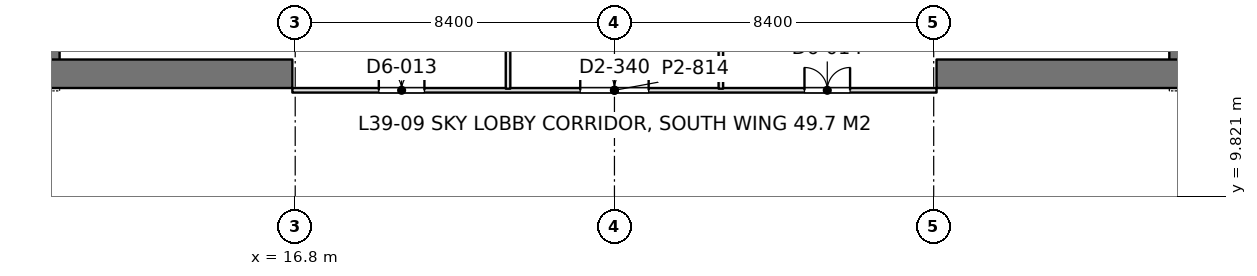
"""IFC4 building model, lengths in metres.
Left out: names, types, materials, properties, quantities, classifications, styles, units other than length and angle.
Written with IfcOpenShell. Run it as: python <this file> out.ifc"""

import sys

from ifc_helpers import new_model, si_unit, direction, frame, frame_2d, origin, place, context, subcontext, project, spatial, rectangle, extrude, element, fill, save


model = new_model("IFC4")
c1 = context("Model", 3, precision=1e-05, world=origin(), true_north=direction((0.0, 1.0)))
c2 = subcontext(c1, "Body", "Model", "MODEL_VIEW")
j1 = project(units=[si_unit("LENGTHUNIT", "METRE"), si_unit("PLANEANGLEUNIT", "RADIAN")], contexts=[c1])
p1 = place(None, origin())
s1 = spatial("IfcSite", under=j1, at=p1, CompositionType="ELEMENT")
p2 = place(p1, origin())
s2 = spatial("IfcBuilding", under=s1, at=p2, CompositionType="ELEMENT")
p3 = place(p2, frame((0.0, 0.0, 173.4)))
s3 = spatial("IfcBuildingStorey", under=s2, at=p3, CompositionType="ELEMENT", Elevation=173.4)
p4 = place(p3, frame((-1.125, 13.05, 0.0), z_axis=(0.0, 0.0, 1.0), x_axis=(1.0, 0.0, 0.0)))
e1 = element("IfcWall", 1, at=p4, inside=s3, PredefinedType="SHEAR", context=c2, shape_type="SweptSolid", body=[
    extrude(rectangle(XDim=17.85, YDim=0.75, at=frame_2d((8.925, 0.0))), origin(), (0.0, 0.0, 1.0), 4.2),
])
p5 = place(p4, frame((8.875, 0.0, 0.0)))
e2 = element("IfcOpeningElement", 2, at=p5, cuts=e1, PredefinedType="OPENING", context=c2, shape_type="SweptSolid", body=[
    extrude(rectangle(XDim=1.8, YDim=2.4, at=frame_2d((0.9, 1.2))), frame((0.0, 0.385, 0.0), z_axis=(0.0, -1.0, 0.0), x_axis=(1.0, 0.0, 0.0)), (0.0, 0.0, 1.0), 0.77),
])
p6 = place(p3, frame((10.4, 13.05, 0.0), z_axis=(0.0, 0.0, 1.0), x_axis=(0.0, 1.0, 0.0)))
e3 = element("IfcWall", 3, at=p6, inside=s3, PredefinedType="SHEAR", context=c2, shape_type="SweptSolid", body=[
    extrude(rectangle(XDim=24.3, YDim=0.4, at=frame_2d((12.15, 0.0))), origin(), (0.0, 0.0, 1.0), 4.2),
])
p7 = place(p6, frame((15.75, 0.0, 0.0)))
e4 = element("IfcOpeningElement", 4, at=p7, cuts=e3, PredefinedType="OPENING", context=c2, shape_type="SweptSolid", body=[
    extrude(rectangle(XDim=1.1, YDim=2.2, at=frame_2d((0.55, 1.1))), frame((0.0, 0.21, 0.0), z_axis=(0.0, -1.0, 0.0), x_axis=(1.0, 0.0, 0.0)), (0.0, 0.0, 1.0), 0.42),
])
p8 = place(p6, frame((18.6, 0.0, 0.0)))
e5 = element("IfcOpeningElement", 5, at=p8, cuts=e3, PredefinedType="OPENING", context=c2, shape_type="SweptSolid", body=[
    extrude(rectangle(XDim=1.1, YDim=2.2, at=frame_2d((0.55, 1.1))), frame((0.0, 0.21, 0.0), z_axis=(0.0, -1.0, 0.0), x_axis=(1.0, 0.0, 0.0)), (0.0, 0.0, 1.0), 0.42),
])
p9 = place(p6, frame((21.45, 0.0, 0.0)))
e6 = element("IfcOpeningElement", 6, at=p9, cuts=e3, PredefinedType="OPENING", context=c2, shape_type="SweptSolid", body=[
    extrude(rectangle(XDim=1.1, YDim=2.2, at=frame_2d((0.55, 1.1))), frame((0.0, 0.21, 0.0), z_axis=(0.0, -1.0, 0.0), x_axis=(1.0, 0.0, 0.0)), (0.0, 0.0, 1.0), 0.42),
])
p10 = place(p6, frame((6.05, 0.0, 0.0)))
e7 = element("IfcOpeningElement", 7, at=p10, cuts=e3, PredefinedType="OPENING", context=c2, shape_type="SweptSolid", body=[
    extrude(rectangle(XDim=1.8, YDim=2.4, at=frame_2d((0.9, 1.2))), frame((0.0, 0.21, 0.0), z_axis=(0.0, -1.0, 0.0), x_axis=(1.0, 0.0, 0.0)), (0.0, 0.0, 1.0), 0.42),
])
p11 = place(p6, frame((11.25, 0.0, 0.0)))
e8 = element("IfcOpeningElement", 8, at=p11, cuts=e3, PredefinedType="OPENING", context=c2, shape_type="SweptSolid", body=[
    extrude(rectangle(XDim=1.8, YDim=2.4, at=frame_2d((0.9, 1.2))), frame((0.0, 0.21, 0.0), z_axis=(0.0, -1.0, 0.0), x_axis=(1.0, 0.0, 0.0)), (0.0, 0.0, 1.0), 0.42),
])
p12 = place(p3, frame((33.675, 13.05, 0.0), z_axis=(0.0, 0.0, 1.0), x_axis=(1.0, 0.0, 0.0)))
e9 = element("IfcWall", 9, at=p12, inside=s3, PredefinedType="SHEAR", context=c2, shape_type="SweptSolid", body=[
    extrude(rectangle(XDim=17.85, YDim=0.75, at=frame_2d((8.925, 0.0))), origin(), (0.0, 0.0, 1.0), 4.2),
])
p13 = place(p12, frame((7.175, 0.0, 0.0)))
e10 = element("IfcOpeningElement", 10, at=p13, cuts=e9, PredefinedType="OPENING", context=c2, shape_type="SweptSolid", body=[
    extrude(rectangle(XDim=1.8, YDim=2.4, at=frame_2d((0.9, 1.2))), frame((0.0, 0.385, 0.0), z_axis=(0.0, -1.0, 0.0), x_axis=(1.0, 0.0, 0.0)), (0.0, 0.0, 1.0), 0.77),
])
p14 = place(p3, frame((40.0, 13.05, 0.0), z_axis=(0.0, 0.0, 1.0), x_axis=(0.0, 1.0, 0.0)))
e11 = element("IfcWall", 11, at=p14, inside=s3, PredefinedType="SHEAR", context=c2, shape_type="SweptSolid", body=[
    extrude(rectangle(XDim=24.3, YDim=0.4, at=frame_2d((12.15, 0.0))), origin(), (0.0, 0.0, 1.0), 4.2),
])
p15 = place(p14, frame((15.75, 0.0, 0.0)))
e12 = element("IfcOpeningElement", 12, at=p15, cuts=e11, PredefinedType="OPENING", context=c2, shape_type="SweptSolid", body=[
    extrude(rectangle(XDim=1.1, YDim=2.2, at=frame_2d((0.55, 1.1))), frame((0.0, 0.21, 0.0), z_axis=(0.0, -1.0, 0.0), x_axis=(1.0, 0.0, 0.0)), (0.0, 0.0, 1.0), 0.42),
])
p16 = place(p14, frame((18.6, 0.0, 0.0)))
e13 = element("IfcOpeningElement", 13, at=p16, cuts=e11, PredefinedType="OPENING", context=c2, shape_type="SweptSolid", body=[
    extrude(rectangle(XDim=1.1, YDim=2.2, at=frame_2d((0.55, 1.1))), frame((0.0, 0.21, 0.0), z_axis=(0.0, -1.0, 0.0), x_axis=(1.0, 0.0, 0.0)), (0.0, 0.0, 1.0), 0.42),
])
p17 = place(p14, frame((21.45, 0.0, 0.0)))
e14 = element("IfcOpeningElement", 14, at=p17, cuts=e11, PredefinedType="OPENING", context=c2, shape_type="SweptSolid", body=[
    extrude(rectangle(XDim=1.1, YDim=2.2, at=frame_2d((0.55, 1.1))), frame((0.0, 0.21, 0.0), z_axis=(0.0, -1.0, 0.0), x_axis=(1.0, 0.0, 0.0)), (0.0, 0.0, 1.0), 0.42),
])
p18 = place(p14, frame((6.05, 0.0, 0.0)))
e15 = element("IfcOpeningElement", 15, at=p18, cuts=e11, PredefinedType="OPENING", context=c2, shape_type="SweptSolid", body=[
    extrude(rectangle(XDim=1.8, YDim=2.4, at=frame_2d((0.9, 1.2))), frame((0.0, 0.21, 0.0), z_axis=(0.0, -1.0, 0.0), x_axis=(1.0, 0.0, 0.0)), (0.0, 0.0, 1.0), 0.42),
])
p19 = place(p14, frame((11.25, 0.0, 0.0)))
e16 = element("IfcOpeningElement", 16, at=p19, cuts=e11, PredefinedType="OPENING", context=c2, shape_type="SweptSolid", body=[
    extrude(rectangle(XDim=1.8, YDim=2.4, at=frame_2d((0.9, 1.2))), frame((0.0, 0.21, 0.0), z_axis=(0.0, -1.0, 0.0), x_axis=(1.0, 0.0, 0.0)), (0.0, 0.0, 1.0), 0.42),
])
p20 = place(p3, frame((16.725, 12.615, 0.0), z_axis=(0.0, 0.0, 1.0), x_axis=(1.0, 0.0, 0.0)))
e17 = element("IfcWall", 17, at=p20, inside=s3, PredefinedType="PARTITIONING", context=c2, shape_type="SweptSolid", body=[
    extrude(rectangle(XDim=16.95, YDim=0.12, at=frame_2d((8.475, 0.0))), origin(), (0.0, 0.0, 1.0), 3.55),
])
p21 = place(p20, frame((2.275, 0.0, 0.0)))
e18 = element("IfcOpeningElement", 18, at=p21, cuts=e17, PredefinedType="OPENING", context=c2, shape_type="SweptSolid", body=[
    extrude(rectangle(XDim=1.2, YDim=2.2, at=frame_2d((0.6, 1.1))), frame((0.0, 0.07, 0.0), z_axis=(0.0, -1.0, 0.0), x_axis=(1.0, 0.0, 0.0)), (0.0, 0.0, 1.0), 0.14),
])
p22 = place(p20, frame((7.575, 0.0, 0.0)))
e19 = element("IfcOpeningElement", 19, at=p22, cuts=e17, PredefinedType="OPENING", context=c2, shape_type="SweptSolid", body=[
    extrude(rectangle(XDim=1.8, YDim=2.2, at=frame_2d((0.9, 1.1))), frame((0.0, 0.07, 0.0), z_axis=(0.0, -1.0, 0.0), x_axis=(1.0, 0.0, 0.0)), (0.0, 0.0, 1.0), 0.14),
])
p23 = place(p20, frame((13.475, 0.0, 0.0)))
e20 = element("IfcOpeningElement", 20, at=p23, cuts=e17, PredefinedType="OPENING", context=c2, shape_type="SweptSolid", body=[
    extrude(rectangle(XDim=1.2, YDim=2.2, at=frame_2d((0.6, 1.1))), frame((0.0, 0.07, 0.0), z_axis=(0.0, -1.0, 0.0), x_axis=(1.0, 0.0, 0.0)), (0.0, 0.0, 1.0), 0.14),
])
for number, where, z_axis, x_axis in (
    (21, (22.4, 12.658, 0.0), (0.0, 0.0, 1.0), (0.0, 1.0, 0.0)),
    (22, (28.0, 12.658, 0.0), (0.0, 0.0, 1.0), (0.0, 1.0, 0.0)),
):
    element("IfcWall", number, at=place(p3, frame(where, z_axis=z_axis, x_axis=x_axis)), inside=s3, PredefinedType="PARTITIONING", context=c2, shape_type="SweptSolid", body=[
        extrude(rectangle(XDim=4.534, YDim=0.12, at=frame_2d((2.267, 0.0))), origin(), (0.0, 0.0, 1.0), 3.2),
    ])
p24 = place(p21, origin())
e23 = element("IfcDoor", 23, at=p24, inside=s3, OperationType="DOUBLE_DOOR_SINGLE_SWING_OPPOSITE_LEFT", PredefinedType="DOOR", context=c2, shape_type="SweptSolid", body=[
    extrude(rectangle(XDim=1.2, YDim=2.2, at=frame_2d((0.6, 1.1))), frame((0.0, 0.025, 0.0), z_axis=(0.0, -1.0, 0.0), x_axis=(1.0, 0.0, 0.0)), (0.0, 0.0, 1.0), 0.05),
])
fill(e18, e23)
p25 = place(p22, origin())
e24 = element("IfcDoor", 24, at=p25, inside=s3, OperationType="DOUBLE_DOOR_SINGLE_SWING", PredefinedType="DOOR", context=c2, shape_type="SweptSolid", body=[
    extrude(rectangle(XDim=1.8, YDim=2.2, at=frame_2d((0.9, 1.1))), frame((0.0, 0.025, 0.0), z_axis=(0.0, -1.0, 0.0), x_axis=(1.0, 0.0, 0.0)), (0.0, 0.0, 1.0), 0.05),
])
fill(e19, e24)
p26 = place(p23, origin())
e25 = element("IfcDoor", 25, at=p26, inside=s3, OperationType="DOUBLE_DOOR_SINGLE_SWING_OPPOSITE_LEFT", PredefinedType="DOOR", context=c2, shape_type="SweptSolid", body=[
    extrude(rectangle(XDim=1.2, YDim=2.2, at=frame_2d((0.6, 1.1))), frame((0.0, 0.025, 0.0), z_axis=(0.0, -1.0, 0.0), x_axis=(1.0, 0.0, 0.0)), (0.0, 0.0, 1.0), 0.05),
])
fill(e20, e25)
save(model, sys.argv[1])
